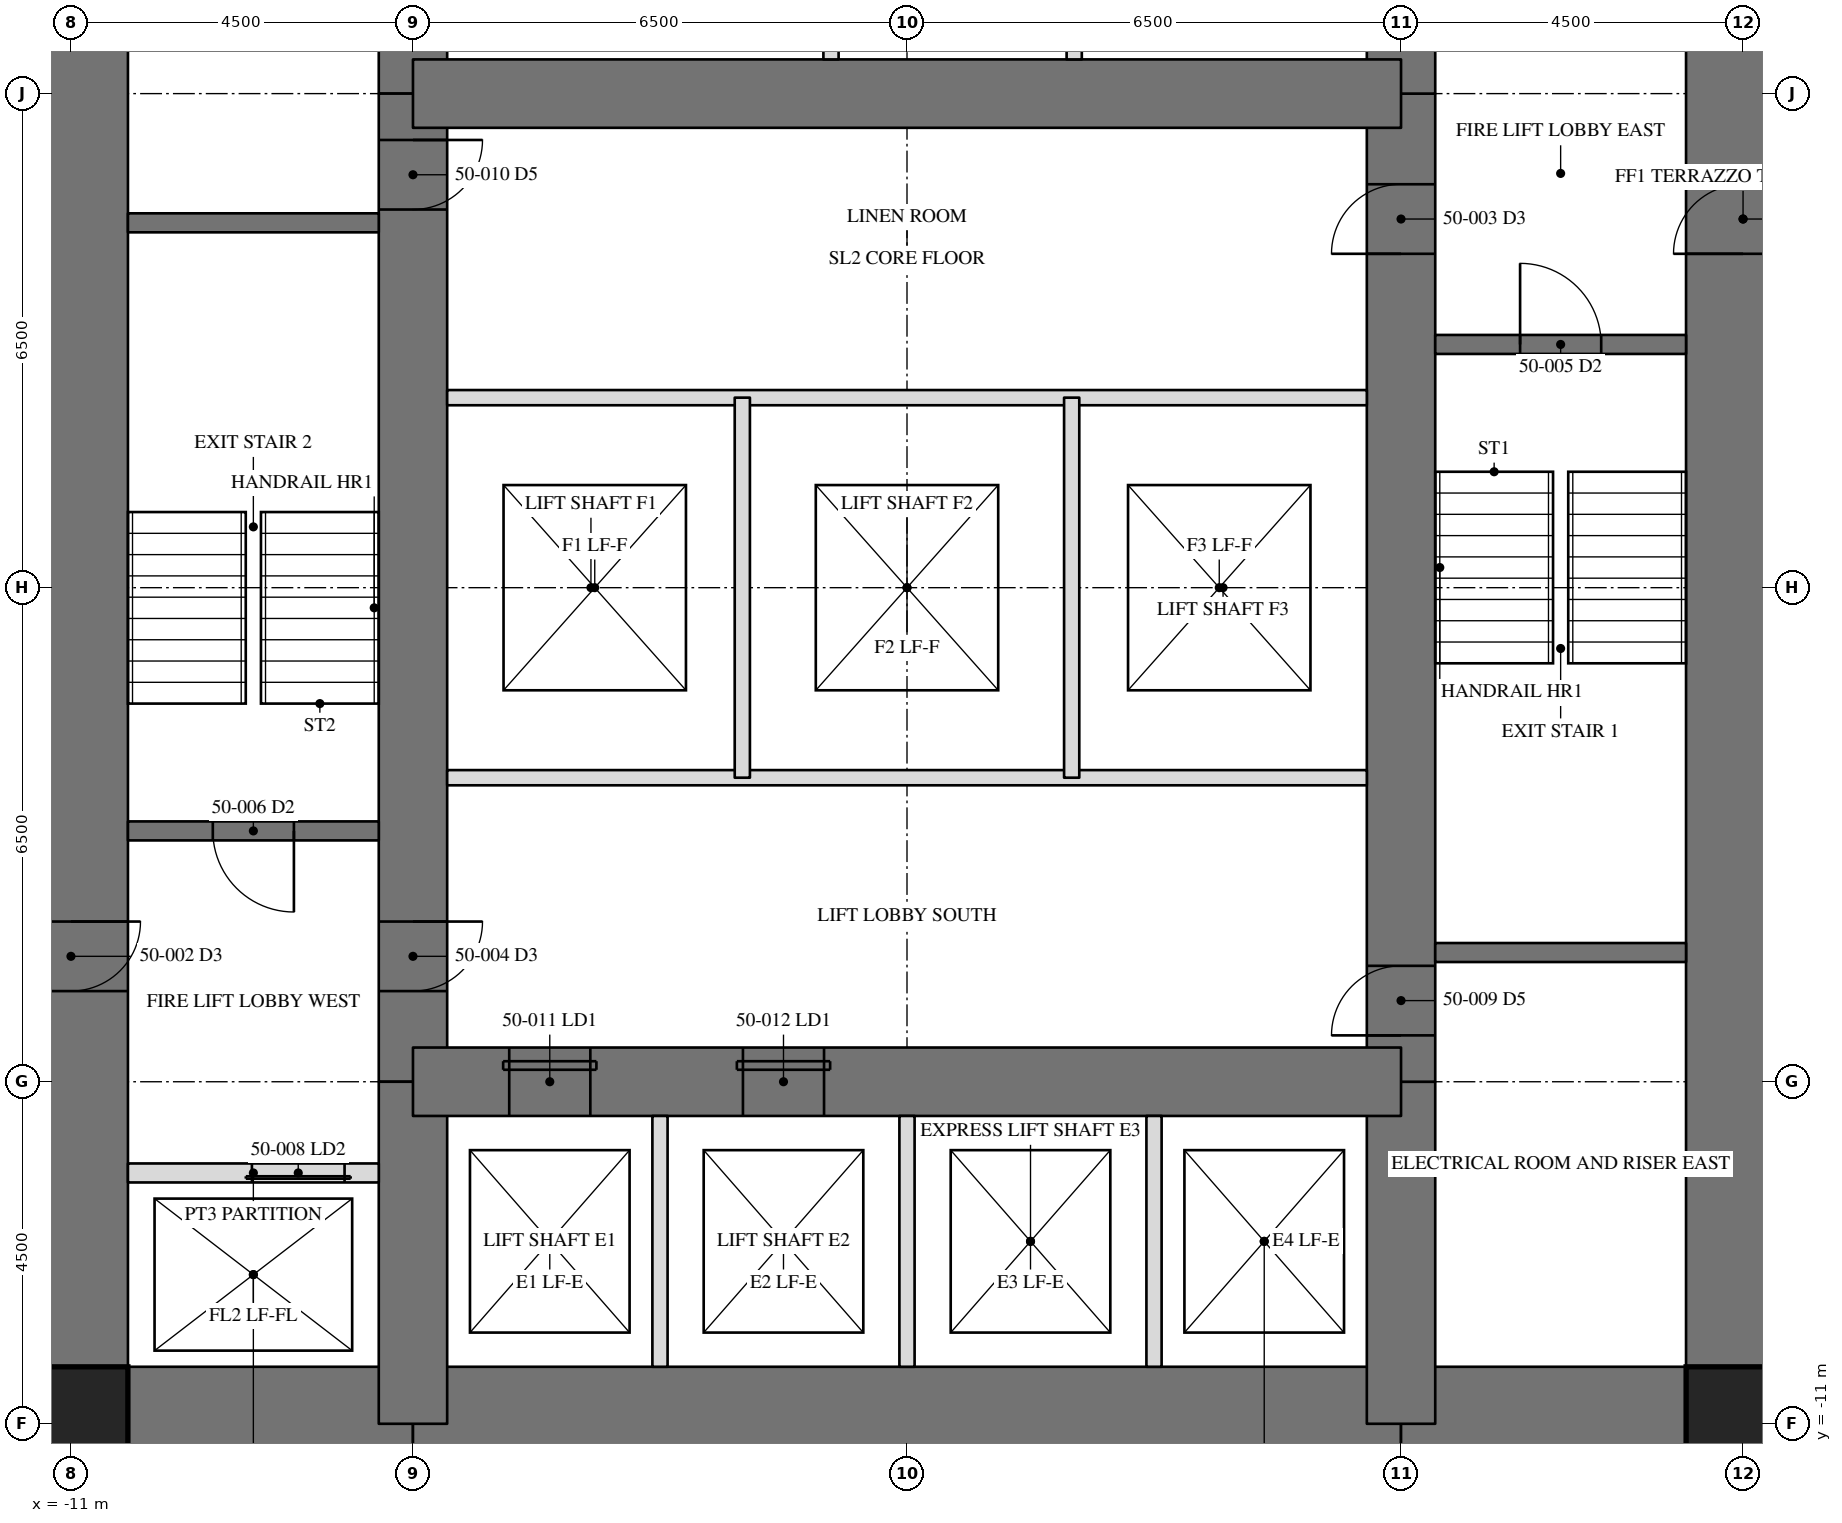
"""IFC4 building model, lengths in metres.
Left out: names, types, materials, properties, quantities, classifications, styles, units other than length and angle.
Written with IfcOpenShell. Run it as: python <this file> out.ifc"""

import sys

from ifc_helpers import new_model, si_unit, direction, frame, frame_2d, origin, origin_2d, place, context, subcontext, project, spatial, rectangle, hollow_rectangle, extrude, element, fill, save


model = new_model("IFC4")
c1 = context("Model", 3, precision=1e-05, world=origin(), true_north=direction((0.0, 1.0)))
c2 = subcontext(c1, "Body", "Model", "MODEL_VIEW")
j1 = project(units=[si_unit("LENGTHUNIT", "METRE"), si_unit("PLANEANGLEUNIT", "RADIAN")], contexts=[c1])
p1 = place(None, origin())
s1 = spatial("IfcSite", under=j1, at=p1, CompositionType="ELEMENT")
p2 = place(p1, origin())
s2 = spatial("IfcBuilding", under=s1, at=p2, CompositionType="ELEMENT")
p3 = place(p2, frame((0.0, 0.0, 211.7)))
s3 = spatial("IfcBuildingStorey", under=s2, at=p3, CompositionType="ELEMENT", Elevation=211.7)
p4 = place(p3, frame((11.0, -11.0, 0.0), z_axis=(0.0, 0.0, 1.0), x_axis=(0.0, 1.0, 0.0)))
e1 = element("IfcWall", 1, at=p4, inside=s3, PredefinedType="SHEAR", context=c2, shape_type="SweptSolid", body=[
    extrude(rectangle(XDim=22.0, YDim=1.5, at=frame_2d((11.0, 0.0))), origin(), (0.0, 0.0, 1.0), 3.5),
])
p5 = place(p4, frame((15.393, 0.0, 0.0)))
e2 = element("IfcOpeningElement", 2, at=p5, cuts=e1, PredefinedType="OPENING", context=c2, shape_type="SweptSolid", body=[
    extrude(rectangle(XDim=0.915, YDim=2.134, at=frame_2d((0.458, 1.067))), frame((0.0, 0.76, 0.0), z_axis=(0.0, -1.0, 0.0), x_axis=(1.0, 0.0, 0.0)), (0.0, 0.0, 1.0), 1.52),
])
p6 = place(p3, frame((-11.0, 11.0, 0.0), z_axis=(0.0, 0.0, 1.0), x_axis=(0.0, -1.0, 0.0)))
e3 = element("IfcWall", 3, at=p6, inside=s3, PredefinedType="SHEAR", context=c2, shape_type="SweptSolid", body=[
    extrude(rectangle(XDim=22.0, YDim=1.5, at=frame_2d((11.0, 0.0))), origin(), (0.0, 0.0, 1.0), 3.5),
])
p7 = place(p6, frame((15.393, 0.0, 0.0)))
e4 = element("IfcOpeningElement", 4, at=p7, cuts=e3, PredefinedType="OPENING", context=c2, shape_type="SweptSolid", body=[
    extrude(rectangle(XDim=0.915, YDim=2.134, at=frame_2d((0.458, 1.067))), frame((0.0, 0.76, 0.0), z_axis=(0.0, -1.0, 0.0), x_axis=(1.0, 0.0, 0.0)), (0.0, 0.0, 1.0), 1.52),
])
p8 = place(p3, frame((-11.0, -11.0, 0.0), z_axis=(0.0, 0.0, 1.0), x_axis=(1.0, 0.0, 0.0)))
e5 = element("IfcWall", 5, at=p8, inside=s3, PredefinedType="SHEAR", context=c2, shape_type="SweptSolid", body=[
    extrude(rectangle(XDim=4.5, YDim=1.5, at=frame_2d((2.25, 0.0))), origin(), (0.0, 0.0, 1.0), 3.5),
])
p9 = place(p3, frame((-6.5, -11.0, 0.0), z_axis=(0.0, 0.0, 1.0), x_axis=(1.0, 0.0, 0.0)))
e6 = element("IfcWall", 6, at=p9, inside=s3, PredefinedType="SHEAR", context=c2, shape_type="SweptSolid", body=[
    extrude(rectangle(XDim=13.0, YDim=1.5, at=frame_2d((6.5, 0.0))), origin(), (0.0, 0.0, 1.0), 3.5),
])
p10 = place(p3, frame((6.5, -11.0, 0.0), z_axis=(0.0, 0.0, 1.0), x_axis=(1.0, 0.0, 0.0)))
e7 = element("IfcWall", 7, at=p10, inside=s3, PredefinedType="SHEAR", context=c2, shape_type="SweptSolid", body=[
    extrude(rectangle(XDim=4.5, YDim=1.5, at=frame_2d((2.25, 0.0))), origin(), (0.0, 0.0, 1.0), 3.5),
])
p11 = place(p3, frame((6.5, -11.0, 0.0), z_axis=(0.0, 0.0, 1.0), x_axis=(0.0, 1.0, 0.0)))
e8 = element("IfcWall", 8, at=p11, inside=s3, PredefinedType="SHEAR", context=c2, shape_type="SweptSolid", body=[
    extrude(rectangle(XDim=4.5, YDim=0.9, at=frame_2d((2.25, 0.0))), origin(), (0.0, 0.0, 1.0), 3.5),
])
p12 = place(p3, frame((6.5, -6.5, 0.0), z_axis=(0.0, 0.0, 1.0), x_axis=(0.0, 1.0, 0.0)))
e9 = element("IfcWall", 9, at=p12, inside=s3, PredefinedType="SHEAR", context=c2, shape_type="SweptSolid", body=[
    extrude(rectangle(XDim=13.0, YDim=0.9, at=frame_2d((6.5, 0.0))), origin(), (0.0, 0.0, 1.0), 3.5),
])
p13 = place(p12, frame((10.893, 0.0, 0.0)))
e10 = element("IfcOpeningElement", 10, at=p13, cuts=e9, PredefinedType="OPENING", context=c2, shape_type="SweptSolid", body=[
    extrude(rectangle(XDim=0.915, YDim=2.134, at=frame_2d((0.458, 1.067))), frame((0.0, 0.46, 0.0), z_axis=(0.0, -1.0, 0.0), x_axis=(1.0, 0.0, 0.0)), (0.0, 0.0, 1.0), 0.92),
])
p14 = place(p12, frame((0.61, 0.0, 0.0)))
e11 = element("IfcOpeningElement", 11, at=p14, cuts=e9, PredefinedType="OPENING", context=c2, shape_type="SweptSolid", body=[
    extrude(rectangle(XDim=0.915, YDim=2.134, at=frame_2d((0.458, 1.067))), frame((0.0, 0.46, 0.0), z_axis=(0.0, -1.0, 0.0), x_axis=(1.0, 0.0, 0.0)), (0.0, 0.0, 1.0), 0.92),
])
for number, where, z_axis, x_axis in (
    (12, (6.5, 6.5, 0.0), (0.0, 0.0, 1.0), (0.0, 1.0, 0.0)),
    (13, (-6.5, 11.0, 0.0), (0.0, 0.0, 1.0), (0.0, -1.0, 0.0)),
):
    element("IfcWall", number, at=place(p3, frame(where, z_axis=z_axis, x_axis=x_axis)), inside=s3, PredefinedType="SHEAR", context=c2, shape_type="SweptSolid", body=[
        extrude(rectangle(XDim=4.5, YDim=0.9, at=frame_2d((2.25, 0.0))), origin(), (0.0, 0.0, 1.0), 3.5),
    ])
p15 = place(p3, frame((-6.5, 6.5, 0.0), z_axis=(0.0, 0.0, 1.0), x_axis=(0.0, -1.0, 0.0)))
e14 = element("IfcWall", 14, at=p15, inside=s3, PredefinedType="SHEAR", context=c2, shape_type="SweptSolid", body=[
    extrude(rectangle(XDim=13.0, YDim=0.9, at=frame_2d((6.5, 0.0))), origin(), (0.0, 0.0, 1.0), 3.5),
])
p16 = place(p15, frame((10.893, 0.0, 0.0)))
e15 = element("IfcOpeningElement", 15, at=p16, cuts=e14, PredefinedType="OPENING", context=c2, shape_type="SweptSolid", body=[
    extrude(rectangle(XDim=0.915, YDim=2.134, at=frame_2d((0.458, 1.067))), frame((0.0, 0.46, 0.0), z_axis=(0.0, -1.0, 0.0), x_axis=(1.0, 0.0, 0.0)), (0.0, 0.0, 1.0), 0.92),
])
p17 = place(p15, frame((0.61, 0.0, 0.0)))
e16 = element("IfcOpeningElement", 16, at=p17, cuts=e14, PredefinedType="OPENING", context=c2, shape_type="SweptSolid", body=[
    extrude(rectangle(XDim=0.915, YDim=2.134, at=frame_2d((0.458, 1.067))), frame((0.0, 0.46, 0.0), z_axis=(0.0, -1.0, 0.0), x_axis=(1.0, 0.0, 0.0)), (0.0, 0.0, 1.0), 0.92),
])
p18 = place(p3, frame((-6.5, -6.5, 0.0), z_axis=(0.0, 0.0, 1.0), x_axis=(0.0, -1.0, 0.0)))
e17 = element("IfcWall", 17, at=p18, inside=s3, PredefinedType="SHEAR", context=c2, shape_type="SweptSolid", body=[
    extrude(rectangle(XDim=4.5, YDim=0.9, at=frame_2d((2.25, 0.0))), origin(), (0.0, 0.0, 1.0), 3.5),
])
p19 = place(p3, frame((6.5, 6.5, 0.0), z_axis=(0.0, 0.0, 1.0), x_axis=(-1.0, 0.0, 0.0)))
e18 = element("IfcWall", 18, at=p19, inside=s3, PredefinedType="SHEAR", context=c2, shape_type="SweptSolid", body=[
    extrude(rectangle(XDim=13.0, YDim=0.9, at=frame_2d((6.5, 0.0))), origin(), (0.0, 0.0, 1.0), 3.5),
])
p20 = place(p3, frame((-6.5, -6.5, 0.0), z_axis=(0.0, 0.0, 1.0), x_axis=(1.0, 0.0, 0.0)))
e19 = element("IfcWall", 19, at=p20, inside=s3, PredefinedType="SHEAR", context=c2, shape_type="SweptSolid", body=[
    extrude(rectangle(XDim=13.0, YDim=0.9, at=frame_2d((6.5, 0.0))), origin(), (0.0, 0.0, 1.0), 3.5),
])
p21 = place(p20, frame((1.267, 0.0, 0.0)))
e20 = element("IfcOpeningElement", 20, at=p21, cuts=e19, PredefinedType="OPENING", context=c2, shape_type="SweptSolid", body=[
    extrude(rectangle(XDim=1.067, YDim=2.134, at=frame_2d((0.533, 1.067))), frame((0.0, 0.46, 0.0), z_axis=(0.0, -1.0, 0.0), x_axis=(1.0, 0.0, 0.0)), (0.0, 0.0, 1.0), 0.92),
])
p22 = place(p20, frame((4.342, 0.0, 0.0)))
e21 = element("IfcOpeningElement", 21, at=p22, cuts=e19, PredefinedType="OPENING", context=c2, shape_type="SweptSolid", body=[
    extrude(rectangle(XDim=1.067, YDim=2.134, at=frame_2d((0.533, 1.067))), frame((0.0, 0.46, 0.0), z_axis=(0.0, -1.0, 0.0), x_axis=(1.0, 0.0, 0.0)), (0.0, 0.0, 1.0), 0.92),
])
for number, where, z_axis, x_axis in (
    (22, (-11.0, -11.0, 0.0), (0.0, 0.0, 1.0), (1.0, 0.0, 0.0)),
    (23, (11.0, -11.0, 0.0), (0.0, 0.0, 1.0), (1.0, 0.0, 0.0)),
):
    element("IfcColumn", number, at=place(p3, frame(where, z_axis=z_axis, x_axis=x_axis)), inside=s3, PredefinedType="COLUMN", context=c2, shape_type="SweptSolid", body=[
        extrude(hollow_rectangle(XDim=1.499, YDim=1.499, WallThickness=0.102, at=origin_2d()), origin(), (0.0, 0.0, 1.0), 3.5),
    ])
for number, where, z_axis, x_axis in (
    (24, (6.95, -4.8, 0.0), (0.0, 0.0, 1.0), (1.0, 0.0, 0.0)),
    (25, (-6.95, 4.8, 0.0), (0.0, 0.0, 1.0), (-1.0, 0.0, 0.0)),
):
    element("IfcWall", number, at=place(p3, frame(where, z_axis=z_axis, x_axis=x_axis)), inside=s3, PredefinedType="SOLIDWALL", context=c2, shape_type="SweptSolid", body=[
        extrude(rectangle(XDim=3.3, YDim=0.25, at=frame_2d((1.65, 0.0))), origin(), (0.0, 0.0, 1.0), 3.31),
    ])
p23 = place(p3, frame((6.95, 3.2, 0.0), z_axis=(0.0, 0.0, 1.0), x_axis=(1.0, 0.0, 0.0)))
e26 = element("IfcWall", 26, at=p23, inside=s3, PredefinedType="SOLIDWALL", context=c2, shape_type="SweptSolid", body=[
    extrude(rectangle(XDim=3.3, YDim=0.25, at=frame_2d((1.65, 0.0))), origin(), (0.0, 0.0, 1.0), 3.31),
])
p24 = place(p23, frame((1.116, 0.0, 0.0)))
e27 = element("IfcOpeningElement", 27, at=p24, cuts=e26, PredefinedType="OPENING", context=c2, shape_type="SweptSolid", body=[
    extrude(rectangle(XDim=1.067, YDim=2.134, at=frame_2d((0.533, 1.067))), frame((0.0, 0.135, 0.0), z_axis=(0.0, -1.0, 0.0), x_axis=(1.0, 0.0, 0.0)), (0.0, 0.0, 1.0), 0.27),
])
p25 = place(p3, frame((-6.95, -3.2, 0.0), z_axis=(0.0, 0.0, 1.0), x_axis=(-1.0, 0.0, 0.0)))
e28 = element("IfcWall", 28, at=p25, inside=s3, PredefinedType="SOLIDWALL", context=c2, shape_type="SweptSolid", body=[
    extrude(rectangle(XDim=3.3, YDim=0.25, at=frame_2d((1.65, 0.0))), origin(), (0.0, 0.0, 1.0), 3.31),
])
p26 = place(p25, frame((1.116, 0.0, 0.0)))
e29 = element("IfcOpeningElement", 29, at=p26, cuts=e28, PredefinedType="OPENING", context=c2, shape_type="SweptSolid", body=[
    extrude(rectangle(XDim=1.067, YDim=2.134, at=frame_2d((0.533, 1.067))), frame((0.0, 0.135, 0.0), z_axis=(0.0, -1.0, 0.0), x_axis=(1.0, 0.0, 0.0)), (0.0, 0.0, 1.0), 0.27),
])
p27 = place(p3, frame((-6.95, -7.7, 0.0), z_axis=(0.0, 0.0, 1.0), x_axis=(-1.0, 0.0, 0.0)))
e30 = element("IfcWall", 30, at=p27, inside=s3, PredefinedType="PARTITIONING", context=c2, shape_type="SweptSolid", body=[
    extrude(rectangle(XDim=3.3, YDim=0.25, at=frame_2d((1.65, 0.0))), origin(), (0.0, 0.0, 1.0), 3.31),
])
p28 = place(p27, frame((0.45, 0.0, 0.0)))
e31 = element("IfcOpeningElement", 31, at=p28, cuts=e30, PredefinedType="OPENING", context=c2, shape_type="SweptSolid", body=[
    extrude(rectangle(XDim=1.219, YDim=2.134, at=frame_2d((0.609, 1.067))), frame((0.0, 0.135, 0.0), z_axis=(0.0, -1.0, 0.0), x_axis=(1.0, 0.0, 0.0)), (0.0, 0.0, 1.0), 0.27),
])
for number, where, z_axis, x_axis in (
    (32, (-6.05, 2.5, 0.0), (0.0, 0.0, 1.0), (1.0, 0.0, 0.0)),
    (33, (6.05, -2.5, 0.0), (0.0, 0.0, 1.0), (-1.0, 0.0, 0.0)),
):
    element("IfcWall", number, at=place(p3, frame(where, z_axis=z_axis, x_axis=x_axis)), inside=s3, PredefinedType="PARTITIONING", context=c2, shape_type="SweptSolid", body=[
        extrude(rectangle(XDim=12.1, YDim=0.2, at=frame_2d((6.05, 0.0))), origin(), (0.0, 0.0, 1.0), 3.31),
    ])
for number, where, z_axis, x_axis in (
    (34, (-3.25, -10.25, 0.0), (0.0, 0.0, 1.0), (0.0, 1.0, 0.0)),
    (35, (0.0, -10.25, 0.0), (0.0, 0.0, 1.0), (0.0, 1.0, 0.0)),
    (36, (3.25, -10.25, 0.0), (0.0, 0.0, 1.0), (0.0, 1.0, 0.0)),
):
    element("IfcWall", number, at=place(p3, frame(where, z_axis=z_axis, x_axis=x_axis)), inside=s3, PredefinedType="PARTITIONING", context=c2, shape_type="SweptSolid", body=[
        extrude(rectangle(XDim=3.3, YDim=0.2, at=frame_2d((1.65, 0.0))), origin(), (0.0, 0.0, 1.0), 3.31),
    ])
for number, where, z_axis, x_axis in (
    (37, (-2.167, -2.5, 0.0), (0.0, 0.0, 1.0), (0.0, 1.0, 0.0)),
    (38, (2.167, -2.5, 0.0), (0.0, 0.0, 1.0), (0.0, 1.0, 0.0)),
):
    element("IfcWall", number, at=place(p3, frame(where, z_axis=z_axis, x_axis=x_axis)), inside=s3, PredefinedType="PARTITIONING", context=c2, shape_type="SweptSolid", body=[
        extrude(rectangle(XDim=5.0, YDim=0.2, at=frame_2d((2.5, 0.0))), origin(), (0.0, 0.0, 1.0), 3.31),
    ])
p29 = place(p3, frame((-1.0, 6.95, 0.0), z_axis=(0.0, 0.0, 1.0), x_axis=(0.0, 1.0, 0.0)))
e39 = element("IfcWall", 39, at=p29, inside=s3, PredefinedType="PARTITIONING", context=c2, shape_type="SweptSolid", body=[
    extrude(rectangle(XDim=3.3, YDim=0.2, at=frame_2d((1.65, 0.0))), origin(), (0.0, 0.0, 1.0), 3.31),
])
p30 = place(p29, frame((1.192, 0.0, 0.0)))
e40 = element("IfcOpeningElement", 40, at=p30, cuts=e39, PredefinedType="OPENING", context=c2, shape_type="SweptSolid", body=[
    extrude(rectangle(XDim=0.915, YDim=2.134, at=frame_2d((0.458, 1.067))), frame((0.0, 0.11, 0.0), z_axis=(0.0, -1.0, 0.0), x_axis=(1.0, 0.0, 0.0)), (0.0, 0.0, 1.0), 0.22),
])
p31 = place(p3, frame((2.2, 6.95, 0.0), z_axis=(0.0, 0.0, 1.0), x_axis=(0.0, 1.0, 0.0)))
e41 = element("IfcWall", 41, at=p31, inside=s3, PredefinedType="PARTITIONING", context=c2, shape_type="SweptSolid", body=[
    extrude(rectangle(XDim=3.3, YDim=0.2, at=frame_2d((1.65, 0.0))), origin(), (0.0, 0.0, 1.0), 3.31),
])
p32 = place(p31, frame((1.192, 0.0, 0.0)))
e42 = element("IfcOpeningElement", 42, at=p32, cuts=e41, PredefinedType="OPENING", context=c2, shape_type="SweptSolid", body=[
    extrude(rectangle(XDim=0.915, YDim=2.134, at=frame_2d((0.458, 1.067))), frame((0.0, 0.11, 0.0), z_axis=(0.0, -1.0, 0.0), x_axis=(1.0, 0.0, 0.0)), (0.0, 0.0, 1.0), 0.22),
])
p33 = place(p13, origin())
e43 = element("IfcDoor", 43, at=p33, inside=s3, OperationType="SINGLE_SWING_RIGHT", PredefinedType="DOOR", context=c2, shape_type="SweptSolid", body=[
    extrude(rectangle(XDim=0.915, YDim=2.134, at=frame_2d((0.458, 1.067))), frame((0.0, -0.375, 0.0), z_axis=(0.0, -1.0, 0.0), x_axis=(1.0, 0.0, 0.0)), (0.0, 0.0, 1.0), 0.05),
])
fill(e10, e43)
p34 = place(p16, origin())
e44 = element("IfcDoor", 44, at=p34, inside=s3, OperationType="SINGLE_SWING_RIGHT", PredefinedType="DOOR", context=c2, shape_type="SweptSolid", body=[
    extrude(rectangle(XDim=0.915, YDim=2.134, at=frame_2d((0.458, 1.067))), frame((0.0, -0.375, 0.0), z_axis=(0.0, -1.0, 0.0), x_axis=(1.0, 0.0, 0.0)), (0.0, 0.0, 1.0), 0.05),
])
fill(e15, e44)
p35 = place(p24, origin())
e45 = element("IfcDoor", 45, at=p35, inside=s3, OperationType="SINGLE_SWING_LEFT", PredefinedType="DOOR", context=c2, shape_type="SweptSolid", body=[
    extrude(rectangle(XDim=1.067, YDim=2.134, at=frame_2d((0.533, 1.067))), frame((0.0, 0.025, 0.0), z_axis=(0.0, -1.0, 0.0), x_axis=(1.0, 0.0, 0.0)), (0.0, 0.0, 1.0), 0.05),
])
fill(e27, e45)
p36 = place(p26, origin())
e46 = element("IfcDoor", 46, at=p36, inside=s3, OperationType="SINGLE_SWING_LEFT", PredefinedType="DOOR", context=c2, shape_type="SweptSolid", body=[
    extrude(rectangle(XDim=1.067, YDim=2.134, at=frame_2d((0.533, 1.067))), frame((0.0, 0.025, 0.0), z_axis=(0.0, -1.0, 0.0), x_axis=(1.0, 0.0, 0.0)), (0.0, 0.0, 1.0), 0.05),
])
fill(e29, e46)
p37 = place(p28, origin())
e47 = element("IfcDoor", 47, at=p37, inside=s3, OperationType="SLIDING_TO_LEFT", PredefinedType="DOOR", context=c2, shape_type="SweptSolid", body=[
    extrude(rectangle(XDim=1.219, YDim=2.134, at=frame_2d((0.609, 1.067))), frame((0.0, 0.025, 0.0), z_axis=(0.0, -1.0, 0.0), x_axis=(1.0, 0.0, 0.0)), (0.0, 0.0, 1.0), 0.05),
])
fill(e31, e47)
p38 = place(p14, origin())
e48 = element("IfcDoor", 48, at=p38, inside=s3, OperationType="SINGLE_SWING_RIGHT", PredefinedType="DOOR", context=c2, shape_type="SweptSolid", body=[
    extrude(rectangle(XDim=0.915, YDim=2.134, at=frame_2d((0.458, 1.067))), frame((0.0, -0.375, 0.0), z_axis=(0.0, -1.0, 0.0), x_axis=(1.0, 0.0, 0.0)), (0.0, 0.0, 1.0), 0.05),
])
fill(e11, e48)
p39 = place(p17, origin())
e49 = element("IfcDoor", 49, at=p39, inside=s3, OperationType="SINGLE_SWING_RIGHT", PredefinedType="DOOR", context=c2, shape_type="SweptSolid", body=[
    extrude(rectangle(XDim=0.915, YDim=2.134, at=frame_2d((0.458, 1.067))), frame((0.0, -0.375, 0.0), z_axis=(0.0, -1.0, 0.0), x_axis=(1.0, 0.0, 0.0)), (0.0, 0.0, 1.0), 0.05),
])
fill(e16, e49)
p40 = place(p21, origin())
e50 = element("IfcDoor", 50, at=p40, inside=s3, OperationType="SLIDING_TO_LEFT", PredefinedType="DOOR", context=c2, shape_type="SweptSolid", body=[
    extrude(rectangle(XDim=1.067, YDim=2.134, at=frame_2d((0.533, 1.067))), frame((0.0, -0.375, 0.0), z_axis=(0.0, -1.0, 0.0), x_axis=(1.0, 0.0, 0.0)), (0.0, 0.0, 1.0), 0.05),
])
fill(e20, e50)
p41 = place(p22, origin())
e51 = element("IfcDoor", 51, at=p41, inside=s3, OperationType="SLIDING_TO_LEFT", PredefinedType="DOOR", context=c2, shape_type="SweptSolid", body=[
    extrude(rectangle(XDim=1.067, YDim=2.134, at=frame_2d((0.533, 1.067))), frame((0.0, -0.375, 0.0), z_axis=(0.0, -1.0, 0.0), x_axis=(1.0, 0.0, 0.0)), (0.0, 0.0, 1.0), 0.05),
])
fill(e21, e51)
save(model, sys.argv[1])
